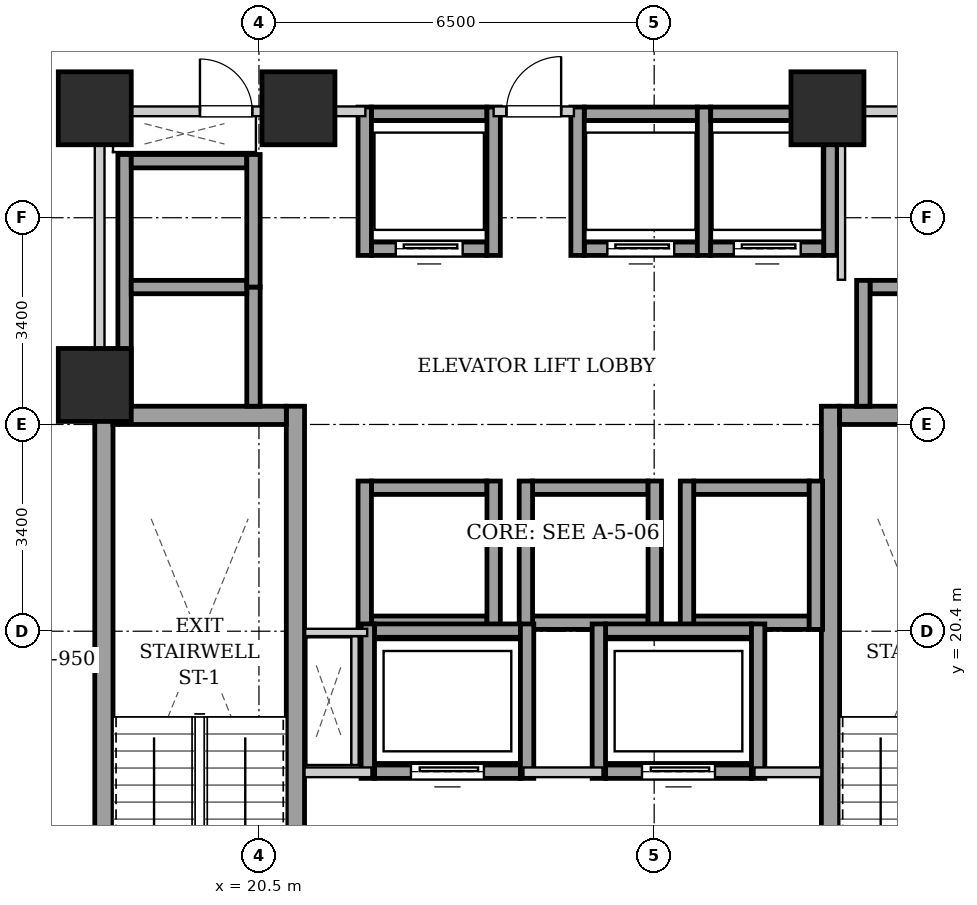
"""IFC4 building model, lengths in metres.
Left out: names, types, materials, properties, quantities, classifications, styles, units other than length and angle.
Written with IfcOpenShell. Run it as: python <this file> out.ifc"""

import sys

from ifc_helpers import new_model, si_unit, direction, frame, frame_2d, origin, origin_2d, place, context, subcontext, project, spatial, rectangle, extrude, element, fill, save


model = new_model("IFC4")
c1 = context("Model", 3, precision=1e-05, world=origin(), true_north=direction((0.0, 1.0)))
c2 = subcontext(c1, "Body", "Model", "MODEL_VIEW")
j1 = project(units=[si_unit("LENGTHUNIT", "METRE"), si_unit("PLANEANGLEUNIT", "RADIAN")], contexts=[c1])
p1 = place(None, origin())
s1 = spatial("IfcSite", under=j1, at=p1, CompositionType="ELEMENT")
p2 = place(p1, origin())
s2 = spatial("IfcBuilding", under=s1, at=p2, CompositionType="ELEMENT")
p3 = place(p2, frame((0.0, 0.0, 25.8)))
s3 = spatial("IfcBuildingStorey", under=s2, at=p3, CompositionType="ELEMENT", Elevation=25.8)
for number, where, z_axis, x_axis in (
    (1, (17.8, 29.0, 0.0), (0.0, 0.0, 1.0), (1.0, 0.0, 0.0)),
    (2, (21.15, 29.0, 0.0), (0.0, 0.0, 1.0), (1.0, 0.0, 0.0)),
    (3, (29.85, 29.0, 0.0), (0.0, 0.0, 1.0), (1.0, 0.0, 0.0)),
    (4, (17.8, 24.45, 0.0), (0.0, 0.0, 1.0), (1.0, 0.0, 0.0)),
):
    element("IfcColumn", number, at=place(p3, frame(where, z_axis=z_axis, x_axis=x_axis)), inside=s3, PredefinedType="COLUMN", context=c2, shape_type="SweptSolid", body=[
        extrude(rectangle(XDim=1.2, YDim=1.2, at=origin_2d()), origin(), (0.0, 0.0, 1.0), 3.2),
    ])
for number, where, z_axis, x_axis in (
    (5, (17.95, 15.1, 0.0), (0.0, 0.0, 1.0), (0.0, 1.0, 0.0)),
    (6, (21.1, 15.1, 0.0), (0.0, 0.0, 1.0), (0.0, 1.0, 0.0)),
):
    element("IfcWall", number, at=place(p3, frame(where, z_axis=z_axis, x_axis=x_axis)), inside=s3, PredefinedType="SHEAR", context=c2, shape_type="SweptSolid", body=[
        extrude(rectangle(XDim=9.0, YDim=0.3, at=frame_2d((4.5, 0.0))), origin(), (0.0, 0.0, 1.0), 2.94),
    ])
p4 = place(p3, frame((18.1, 23.95, 0.0), z_axis=(0.0, 0.0, 1.0), x_axis=(1.0, 0.0, 0.0)))
e7 = element("IfcWall", 7, at=p4, inside=s3, PredefinedType="SHEAR", context=c2, shape_type="SweptSolid", body=[
    extrude(rectangle(XDim=2.85, YDim=0.3, at=frame_2d((1.425, 0.0))), origin(), (0.0, 0.0, 1.0), 2.94),
])
p5 = place(p3, frame((29.9, 15.1, 0.0), z_axis=(0.0, 0.0, 1.0), x_axis=(0.0, 1.0, 0.0)))
e8 = element("IfcWall", 8, at=p5, inside=s3, PredefinedType="SHEAR", context=c2, shape_type="SweptSolid", body=[
    extrude(rectangle(XDim=9.0, YDim=0.3, at=frame_2d((4.5, 0.0))), origin(), (0.0, 0.0, 1.0), 2.94),
])
p6 = place(p3, frame((30.05, 23.95, 0.0), z_axis=(0.0, 0.0, 1.0), x_axis=(1.0, 0.0, 0.0)))
e9 = element("IfcWall", 9, at=p6, inside=s3, PredefinedType="SHEAR", context=c2, shape_type="SweptSolid", body=[
    extrude(rectangle(XDim=2.85, YDim=0.3, at=frame_2d((1.425, 0.0))), origin(), (0.0, 0.0, 1.0), 2.94),
])
p7 = place(p3, frame((22.35, 26.69, 0.0), z_axis=(0.0, 0.0, 1.0), x_axis=(1.0, 0.0, 0.0)))
e10 = element("IfcWall", 10, at=p7, inside=s3, PredefinedType="SHEAR", context=c2, shape_type="SweptSolid", body=[
    extrude(rectangle(XDim=1.9, YDim=0.22, at=frame_2d((0.95, 0.0))), origin(), (0.0, 0.0, 1.0), 2.94),
])
p8 = place(p7, frame((0.4, 0.0, 0.0)))
e11 = element("IfcOpeningElement", 11, at=p8, cuts=e10, PredefinedType="OPENING", context=c2, shape_type="SweptSolid", body=[
    extrude(rectangle(XDim=1.1, YDim=2.15, at=frame_2d((0.55, 1.075))), frame((0.0, 0.12, 0.0), z_axis=(0.0, -1.0, 0.0), x_axis=(1.0, 0.0, 0.0)), (0.0, 0.0, 1.0), 0.24),
])
p9 = place(p3, frame((22.35, 28.91, 0.0), z_axis=(0.0, 0.0, 1.0), x_axis=(1.0, 0.0, 0.0)))
e12 = element("IfcWall", 12, at=p9, inside=s3, PredefinedType="SHEAR", context=c2, shape_type="SweptSolid", body=[
    extrude(rectangle(XDim=1.9, YDim=0.22, at=frame_2d((0.95, 0.0))), origin(), (0.0, 0.0, 1.0), 2.94),
])
for number, where, z_axis, x_axis in (
    (13, (22.24, 26.58, 0.0), (0.0, 0.0, 1.0), (0.0, 1.0, 0.0)),
    (14, (24.36, 26.58, 0.0), (0.0, 0.0, 1.0), (0.0, 1.0, 0.0)),
):
    element("IfcWall", number, at=place(p3, frame(where, z_axis=z_axis, x_axis=x_axis)), inside=s3, PredefinedType="SHEAR", context=c2, shape_type="SweptSolid", body=[
        extrude(rectangle(XDim=2.44, YDim=0.22, at=frame_2d((1.22, 0.0))), origin(), (0.0, 0.0, 1.0), 2.94),
    ])
p10 = place(p3, frame((25.85, 26.69, 0.0), z_axis=(0.0, 0.0, 1.0), x_axis=(1.0, 0.0, 0.0)))
e15 = element("IfcWall", 15, at=p10, inside=s3, PredefinedType="SHEAR", context=c2, shape_type="SweptSolid", body=[
    extrude(rectangle(XDim=1.86, YDim=0.22, at=frame_2d((0.93, 0.0))), origin(), (0.0, 0.0, 1.0), 2.94),
])
p11 = place(p10, frame((0.38, 0.0, 0.0)))
e16 = element("IfcOpeningElement", 16, at=p11, cuts=e15, PredefinedType="OPENING", context=c2, shape_type="SweptSolid", body=[
    extrude(rectangle(XDim=1.1, YDim=2.15, at=frame_2d((0.55, 1.075))), frame((0.0, 0.12, 0.0), z_axis=(0.0, -1.0, 0.0), x_axis=(1.0, 0.0, 0.0)), (0.0, 0.0, 1.0), 0.24),
])
p12 = place(p3, frame((25.85, 28.91, 0.0), z_axis=(0.0, 0.0, 1.0), x_axis=(1.0, 0.0, 0.0)))
e17 = element("IfcWall", 17, at=p12, inside=s3, PredefinedType="SHEAR", context=c2, shape_type="SweptSolid", body=[
    extrude(rectangle(XDim=1.86, YDim=0.22, at=frame_2d((0.93, 0.0))), origin(), (0.0, 0.0, 1.0), 2.94),
])
for number, where, z_axis, x_axis in (
    (18, (25.74, 26.58, 0.0), (0.0, 0.0, 1.0), (0.0, 1.0, 0.0)),
    (19, (27.82, 26.58, 0.0), (0.0, 0.0, 1.0), (0.0, 1.0, 0.0)),
):
    element("IfcWall", number, at=place(p3, frame(where, z_axis=z_axis, x_axis=x_axis)), inside=s3, PredefinedType="SHEAR", context=c2, shape_type="SweptSolid", body=[
        extrude(rectangle(XDim=2.44, YDim=0.22, at=frame_2d((1.22, 0.0))), origin(), (0.0, 0.0, 1.0), 2.94),
    ])
p13 = place(p3, frame((27.93, 26.69, 0.0), z_axis=(0.0, 0.0, 1.0), x_axis=(1.0, 0.0, 0.0)))
e20 = element("IfcWall", 20, at=p13, inside=s3, PredefinedType="SHEAR", context=c2, shape_type="SweptSolid", body=[
    extrude(rectangle(XDim=1.86, YDim=0.22, at=frame_2d((0.93, 0.0))), origin(), (0.0, 0.0, 1.0), 2.94),
])
p14 = place(p13, frame((0.38, 0.0, 0.0)))
e21 = element("IfcOpeningElement", 21, at=p14, cuts=e20, PredefinedType="OPENING", context=c2, shape_type="SweptSolid", body=[
    extrude(rectangle(XDim=1.1, YDim=2.15, at=frame_2d((0.55, 1.075))), frame((0.0, 0.12, 0.0), z_axis=(0.0, -1.0, 0.0), x_axis=(1.0, 0.0, 0.0)), (0.0, 0.0, 1.0), 0.24),
])
p15 = place(p3, frame((27.93, 28.91, 0.0), z_axis=(0.0, 0.0, 1.0), x_axis=(1.0, 0.0, 0.0)))
e22 = element("IfcWall", 22, at=p15, inside=s3, PredefinedType="SHEAR", context=c2, shape_type="SweptSolid", body=[
    extrude(rectangle(XDim=1.86, YDim=0.22, at=frame_2d((0.93, 0.0))), origin(), (0.0, 0.0, 1.0), 2.94),
])
p16 = place(p3, frame((29.9, 26.58, 0.0), z_axis=(0.0, 0.0, 1.0), x_axis=(0.0, 1.0, 0.0)))
e23 = element("IfcWall", 23, at=p16, inside=s3, PredefinedType="SHEAR", context=c2, shape_type="SweptSolid", body=[
    extrude(rectangle(XDim=2.44, YDim=0.22, at=frame_2d((1.22, 0.0))), origin(), (0.0, 0.0, 1.0), 2.94),
])
for number, where, z_axis, x_axis in (
    (24, (22.35, 20.54, 0.0), (0.0, 0.0, 1.0), (1.0, 0.0, 0.0)),
    (25, (22.35, 22.76, 0.0), (0.0, 0.0, 1.0), (1.0, 0.0, 0.0)),
):
    element("IfcWall", number, at=place(p3, frame(where, z_axis=z_axis, x_axis=x_axis)), inside=s3, PredefinedType="SHEAR", context=c2, shape_type="SweptSolid", body=[
        extrude(rectangle(XDim=1.9, YDim=0.22, at=frame_2d((0.95, 0.0))), origin(), (0.0, 0.0, 1.0), 2.94),
    ])
for number, where, z_axis, x_axis in (
    (26, (22.24, 20.43, 0.0), (0.0, 0.0, 1.0), (0.0, 1.0, 0.0)),
    (27, (24.36, 20.43, 0.0), (0.0, 0.0, 1.0), (0.0, 1.0, 0.0)),
):
    element("IfcWall", number, at=place(p3, frame(where, z_axis=z_axis, x_axis=x_axis)), inside=s3, PredefinedType="SHEAR", context=c2, shape_type="SweptSolid", body=[
        extrude(rectangle(XDim=2.44, YDim=0.22, at=frame_2d((1.22, 0.0))), origin(), (0.0, 0.0, 1.0), 2.94),
    ])
for number, where, z_axis, x_axis in (
    (28, (25.0, 20.54, 0.0), (0.0, 0.0, 1.0), (1.0, 0.0, 0.0)),
    (29, (25.0, 22.76, 0.0), (0.0, 0.0, 1.0), (1.0, 0.0, 0.0)),
):
    element("IfcWall", number, at=place(p3, frame(where, z_axis=z_axis, x_axis=x_axis)), inside=s3, PredefinedType="SHEAR", context=c2, shape_type="SweptSolid", body=[
        extrude(rectangle(XDim=1.9, YDim=0.22, at=frame_2d((0.95, 0.0))), origin(), (0.0, 0.0, 1.0), 2.94),
    ])
for number, where, z_axis, x_axis in (
    (30, (24.89, 20.43, 0.0), (0.0, 0.0, 1.0), (0.0, 1.0, 0.0)),
    (31, (27.01, 20.43, 0.0), (0.0, 0.0, 1.0), (0.0, 1.0, 0.0)),
):
    element("IfcWall", number, at=place(p3, frame(where, z_axis=z_axis, x_axis=x_axis)), inside=s3, PredefinedType="SHEAR", context=c2, shape_type="SweptSolid", body=[
        extrude(rectangle(XDim=2.44, YDim=0.22, at=frame_2d((1.22, 0.0))), origin(), (0.0, 0.0, 1.0), 2.94),
    ])
for number, where, z_axis, x_axis in (
    (32, (27.65, 20.54, 0.0), (0.0, 0.0, 1.0), (1.0, 0.0, 0.0)),
    (33, (27.65, 22.76, 0.0), (0.0, 0.0, 1.0), (1.0, 0.0, 0.0)),
):
    element("IfcWall", number, at=place(p3, frame(where, z_axis=z_axis, x_axis=x_axis)), inside=s3, PredefinedType="SHEAR", context=c2, shape_type="SweptSolid", body=[
        extrude(rectangle(XDim=1.9, YDim=0.22, at=frame_2d((0.95, 0.0))), origin(), (0.0, 0.0, 1.0), 2.94),
    ])
for number, where, z_axis, x_axis in (
    (34, (27.54, 20.43, 0.0), (0.0, 0.0, 1.0), (0.0, 1.0, 0.0)),
    (35, (29.66, 20.43, 0.0), (0.0, 0.0, 1.0), (0.0, 1.0, 0.0)),
):
    element("IfcWall", number, at=place(p3, frame(where, z_axis=z_axis, x_axis=x_axis)), inside=s3, PredefinedType="SHEAR", context=c2, shape_type="SweptSolid", body=[
        extrude(rectangle(XDim=2.44, YDim=0.22, at=frame_2d((1.22, 0.0))), origin(), (0.0, 0.0, 1.0), 2.94),
    ])
p17 = place(p3, frame((18.29, 24.1, 0.0), z_axis=(0.0, 0.0, 1.0), x_axis=(0.0, 1.0, 0.0)))
e36 = element("IfcWall", 36, at=p17, inside=s3, PredefinedType="SHEAR", context=c2, shape_type="SweptSolid", body=[
    extrude(rectangle(XDim=4.14, YDim=0.22, at=frame_2d((2.07, 0.0))), origin(), (0.0, 0.0, 1.0), 2.94),
])
p18 = place(p3, frame((20.41, 24.1, 0.0), z_axis=(0.0, 0.0, 1.0), x_axis=(0.0, 1.0, 0.0)))
e37 = element("IfcWall", 37, at=p18, inside=s3, PredefinedType="SHEAR", context=c2, shape_type="SweptSolid", body=[
    extrude(rectangle(XDim=1.96, YDim=0.22, at=frame_2d((0.98, 0.0))), origin(), (0.0, 0.0, 1.0), 2.94),
])
for number, where, z_axis, x_axis in (
    (38, (18.4, 26.06, 0.0), (0.0, 0.0, 1.0), (1.0, 0.0, 0.0)),
    (39, (18.4, 28.13, 0.0), (0.0, 0.0, 1.0), (1.0, 0.0, 0.0)),
):
    element("IfcWall", number, at=place(p3, frame(where, z_axis=z_axis, x_axis=x_axis)), inside=s3, PredefinedType="SHEAR", context=c2, shape_type="SweptSolid", body=[
        extrude(rectangle(XDim=1.9, YDim=0.22, at=frame_2d((0.95, 0.0))), origin(), (0.0, 0.0, 1.0), 2.94),
    ])
p19 = place(p3, frame((20.41, 26.06, 0.0), z_axis=(0.0, 0.0, 1.0), x_axis=(0.0, 1.0, 0.0)))
e40 = element("IfcWall", 40, at=p19, inside=s3, PredefinedType="SHEAR", context=c2, shape_type="SweptSolid", body=[
    extrude(rectangle(XDim=2.18, YDim=0.22, at=frame_2d((1.09, 0.0))), origin(), (0.0, 0.0, 1.0), 2.94),
])
p20 = place(p3, frame((30.55, 26.06, 0.0), z_axis=(0.0, 0.0, 1.0), x_axis=(1.0, 0.0, 0.0)))
e41 = element("IfcWall", 41, at=p20, inside=s3, PredefinedType="SHEAR", context=c2, shape_type="SweptSolid", body=[
    extrude(rectangle(XDim=1.9, YDim=0.22, at=frame_2d((0.95, 0.0))), origin(), (0.0, 0.0, 1.0), 2.94),
])
p21 = place(p3, frame((30.44, 24.1, 0.0), z_axis=(0.0, 0.0, 1.0), x_axis=(0.0, 1.0, 0.0)))
e42 = element("IfcWall", 42, at=p21, inside=s3, PredefinedType="SHEAR", context=c2, shape_type="SweptSolid", body=[
    extrude(rectangle(XDim=2.07, YDim=0.22, at=frame_2d((1.035, 0.0))), origin(), (0.0, 0.0, 1.0), 2.94),
])
p22 = place(p3, frame((22.4, 18.09, 0.0), z_axis=(0.0, 0.0, 1.0), x_axis=(1.0, 0.0, 0.0)))
e43 = element("IfcWall", 43, at=p22, inside=s3, PredefinedType="SHEAR", context=c2, shape_type="SweptSolid", body=[
    extrude(rectangle(XDim=2.4, YDim=0.22, at=frame_2d((1.2, 0.0))), origin(), (0.0, 0.0, 1.0), 2.94),
])
p23 = place(p22, frame((0.6, 0.0, 0.0)))
e44 = element("IfcOpeningElement", 44, at=p23, cuts=e43, PredefinedType="OPENING", context=c2, shape_type="SweptSolid", body=[
    extrude(rectangle(XDim=1.2, YDim=2.15, at=frame_2d((0.6, 1.075))), frame((0.0, 0.12, 0.0), z_axis=(0.0, -1.0, 0.0), x_axis=(1.0, 0.0, 0.0)), (0.0, 0.0, 1.0), 0.24),
])
p24 = place(p3, frame((22.4, 20.41, 0.0), z_axis=(0.0, 0.0, 1.0), x_axis=(1.0, 0.0, 0.0)))
e45 = element("IfcWall", 45, at=p24, inside=s3, PredefinedType="SHEAR", context=c2, shape_type="SweptSolid", body=[
    extrude(rectangle(XDim=2.4, YDim=0.22, at=frame_2d((1.2, 0.0))), origin(), (0.0, 0.0, 1.0), 2.94),
])
for number, where, z_axis, x_axis in (
    (46, (22.29, 17.98, 0.0), (0.0, 0.0, 1.0), (0.0, 1.0, 0.0)),
    (47, (24.91, 17.98, 0.0), (0.0, 0.0, 1.0), (0.0, 1.0, 0.0)),
):
    element("IfcWall", number, at=place(p3, frame(where, z_axis=z_axis, x_axis=x_axis)), inside=s3, PredefinedType="SHEAR", context=c2, shape_type="SweptSolid", body=[
        extrude(rectangle(XDim=2.54, YDim=0.22, at=frame_2d((1.27, 0.0))), origin(), (0.0, 0.0, 1.0), 2.94),
    ])
p25 = place(p3, frame((26.2, 18.09, 0.0), z_axis=(0.0, 0.0, 1.0), x_axis=(1.0, 0.0, 0.0)))
e48 = element("IfcWall", 48, at=p25, inside=s3, PredefinedType="SHEAR", context=c2, shape_type="SweptSolid", body=[
    extrude(rectangle(XDim=2.4, YDim=0.22, at=frame_2d((1.2, 0.0))), origin(), (0.0, 0.0, 1.0), 2.94),
])
p26 = place(p25, frame((0.6, 0.0, 0.0)))
e49 = element("IfcOpeningElement", 49, at=p26, cuts=e48, PredefinedType="OPENING", context=c2, shape_type="SweptSolid", body=[
    extrude(rectangle(XDim=1.2, YDim=2.15, at=frame_2d((0.6, 1.075))), frame((0.0, 0.12, 0.0), z_axis=(0.0, -1.0, 0.0), x_axis=(1.0, 0.0, 0.0)), (0.0, 0.0, 1.0), 0.24),
])
p27 = place(p3, frame((26.2, 20.41, 0.0), z_axis=(0.0, 0.0, 1.0), x_axis=(1.0, 0.0, 0.0)))
e50 = element("IfcWall", 50, at=p27, inside=s3, PredefinedType="SHEAR", context=c2, shape_type="SweptSolid", body=[
    extrude(rectangle(XDim=2.4, YDim=0.22, at=frame_2d((1.2, 0.0))), origin(), (0.0, 0.0, 1.0), 2.94),
])
for number, where, z_axis, x_axis in (
    (51, (26.09, 17.98, 0.0), (0.0, 0.0, 1.0), (0.0, 1.0, 0.0)),
    (52, (28.71, 17.98, 0.0), (0.0, 0.0, 1.0), (0.0, 1.0, 0.0)),
):
    element("IfcWall", number, at=place(p3, frame(where, z_axis=z_axis, x_axis=x_axis)), inside=s3, PredefinedType="SHEAR", context=c2, shape_type="SweptSolid", body=[
        extrude(rectangle(XDim=2.54, YDim=0.22, at=frame_2d((1.27, 0.0))), origin(), (0.0, 0.0, 1.0), 2.94),
    ])
p28 = place(p3, frame((21.25, 18.08, 0.0), z_axis=(0.0, 0.0, 1.0), x_axis=(1.0, 0.0, 0.0)))
e53 = element("IfcWall", 53, at=p28, inside=s3, PredefinedType="PARTITIONING", context=c2, shape_type="SweptSolid", body=[
    extrude(rectangle(XDim=1.1, YDim=0.16, at=frame_2d((0.55, 0.0))), origin(), (0.0, 0.0, 1.0), 2.94),
])
p29 = place(p3, frame((24.85, 18.08, 0.0), z_axis=(0.0, 0.0, 1.0), x_axis=(1.0, 0.0, 0.0)))
e54 = element("IfcWall", 54, at=p29, inside=s3, PredefinedType="PARTITIONING", context=c2, shape_type="SweptSolid", body=[
    extrude(rectangle(XDim=1.3, YDim=0.16, at=frame_2d((0.65, 0.0))), origin(), (0.0, 0.0, 1.0), 2.94),
])
p30 = place(p3, frame((28.65, 18.08, 0.0), z_axis=(0.0, 0.0, 1.0), x_axis=(1.0, 0.0, 0.0)))
e55 = element("IfcWall", 55, at=p30, inside=s3, PredefinedType="PARTITIONING", context=c2, shape_type="SweptSolid", body=[
    extrude(rectangle(XDim=1.1, YDim=0.16, at=frame_2d((0.55, 0.0))), origin(), (0.0, 0.0, 1.0), 2.94),
])
p31 = place(p3, frame((17.88, 24.12, 0.0), z_axis=(0.0, 0.0, 1.0), x_axis=(0.0, 1.0, 0.0)))
e56 = element("IfcWall", 56, at=p31, inside=s3, PredefinedType="PARTITIONING", context=c2, shape_type="SweptSolid", body=[
    extrude(rectangle(XDim=4.76, YDim=0.16, at=frame_2d((2.38, 0.0))), origin(), (0.0, 0.0, 1.0), 2.94),
])
p32 = place(p3, frame((24.36, 28.95, 0.0), z_axis=(0.0, 0.0, 1.0), x_axis=(1.0, 0.0, 0.0)))
e57 = element("IfcWall", 57, at=p32, inside=s3, PredefinedType="PARTITIONING", context=c2, shape_type="SweptSolid", body=[
    extrude(rectangle(XDim=1.32, YDim=0.16, at=frame_2d((0.66, 0.0))), origin(), (0.0, 0.0, 1.0), 2.155),
])
p33 = place(p32, frame((0.21, 0.0, 0.0)))
e58 = element("IfcOpeningElement", 58, at=p33, cuts=e57, PredefinedType="OPENING", context=c2, shape_type="SweptSolid", body=[
    extrude(rectangle(XDim=0.9, YDim=2.05, at=frame_2d((0.45, 1.025))), frame((0.0, 0.09, 0.0), z_axis=(0.0, -1.0, 0.0), x_axis=(1.0, 0.0, 0.0)), (0.0, 0.0, 1.0), 0.18),
])
p34 = place(p3, frame((17.96, 28.95, 0.0), z_axis=(0.0, 0.0, 1.0), x_axis=(1.0, 0.0, 0.0)))
e59 = element("IfcWall", 59, at=p34, inside=s3, PredefinedType="PARTITIONING", context=c2, shape_type="SweptSolid", body=[
    extrude(rectangle(XDim=4.29, YDim=0.16, at=frame_2d((2.145, 0.0))), origin(), (0.0, 0.0, 1.0), 2.155),
])
p35 = place(p34, frame((1.57, 0.0, 0.0)))
e60 = element("IfcOpeningElement", 60, at=p35, cuts=e59, PredefinedType="OPENING", context=c2, shape_type="SweptSolid", body=[
    extrude(rectangle(XDim=0.86, YDim=2.05, at=frame_2d((0.43, 1.025))), frame((0.0, 0.09, 0.0), z_axis=(0.0, -1.0, 0.0), x_axis=(1.0, 0.0, 0.0)), (0.0, 0.0, 1.0), 0.18),
])
p36 = place(p3, frame((22.08, 18.2, 0.0), z_axis=(0.0, 0.0, 1.0), x_axis=(0.0, 1.0, 0.0)))
e61 = element("IfcWall", 61, at=p36, inside=s3, PredefinedType="PARTITIONING", context=c2, shape_type="SweptSolid", body=[
    extrude(rectangle(XDim=2.12, YDim=0.12, at=frame_2d((1.06, 0.0))), origin(), (0.0, 0.0, 1.0), 2.94),
])
p37 = place(p3, frame((22.28, 20.38, 0.0), z_axis=(0.0, 0.0, 1.0), x_axis=(-1.0, 0.0, 0.0)))
e62 = element("IfcWall", 62, at=p37, inside=s3, PredefinedType="PARTITIONING", context=c2, shape_type="SweptSolid", body=[
    extrude(rectangle(XDim=1.02, YDim=0.12, at=frame_2d((0.51, 0.0))), origin(), (0.0, 0.0, 1.0), 2.94),
])
p38 = place(p3, frame((30.08, 26.18, 0.0), z_axis=(0.0, 0.0, 1.0), x_axis=(0.0, 1.0, 0.0)))
e63 = element("IfcWall", 63, at=p38, inside=s3, PredefinedType="PARTITIONING", context=c2, shape_type="SweptSolid", body=[
    extrude(rectangle(XDim=2.68, YDim=0.12, at=frame_2d((1.34, 0.0))), origin(), (0.0, 0.0, 1.0), 2.94),
])
p39 = place(p3, frame((30.08, 28.95, 0.0), z_axis=(0.0, 0.0, 1.0), x_axis=(1.0, 0.0, 0.0)))
e64 = element("IfcWall", 64, at=p39, inside=s3, PredefinedType="PARTITIONING", context=c2, shape_type="SweptSolid", body=[
    extrude(rectangle(XDim=2.96, YDim=0.16, at=frame_2d((1.48, 0.0))), origin(), (0.0, 0.0, 1.0), 2.94),
])
p40 = place(p39, frame((1.045, 0.0, 0.0)))
e65 = element("IfcOpeningElement", 65, at=p40, cuts=e64, PredefinedType="OPENING", context=c2, shape_type="SweptSolid", body=[
    extrude(rectangle(XDim=0.86, YDim=2.05, at=frame_2d((0.43, 1.025))), frame((0.0, 0.09, 0.0), z_axis=(0.0, -1.0, 0.0), x_axis=(1.0, 0.0, 0.0)), (0.0, 0.0, 1.0), 0.18),
])
p41 = place(p8, origin())
e66 = element("IfcDoor", 66, at=p41, inside=s3, OperationType="SLIDING_TO_LEFT", PredefinedType="DOOR", context=c2, shape_type="SweptSolid", body=[
    extrude(rectangle(XDim=1.1, YDim=2.15, at=frame_2d((0.55, 1.075))), frame((0.0, 0.025, 0.0), z_axis=(0.0, -1.0, 0.0), x_axis=(1.0, 0.0, 0.0)), (0.0, 0.0, 1.0), 0.05),
])
fill(e11, e66)
p42 = place(p11, origin())
e67 = element("IfcDoor", 67, at=p42, inside=s3, OperationType="SLIDING_TO_LEFT", PredefinedType="DOOR", context=c2, shape_type="SweptSolid", body=[
    extrude(rectangle(XDim=1.1, YDim=2.15, at=frame_2d((0.55, 1.075))), frame((0.0, 0.025, 0.0), z_axis=(0.0, -1.0, 0.0), x_axis=(1.0, 0.0, 0.0)), (0.0, 0.0, 1.0), 0.05),
])
fill(e16, e67)
p43 = place(p14, origin())
e68 = element("IfcDoor", 68, at=p43, inside=s3, OperationType="SLIDING_TO_LEFT", PredefinedType="DOOR", context=c2, shape_type="SweptSolid", body=[
    extrude(rectangle(XDim=1.1, YDim=2.15, at=frame_2d((0.55, 1.075))), frame((0.0, 0.025, 0.0), z_axis=(0.0, -1.0, 0.0), x_axis=(1.0, 0.0, 0.0)), (0.0, 0.0, 1.0), 0.05),
])
fill(e21, e68)
p44 = place(p23, origin())
e69 = element("IfcDoor", 69, at=p44, inside=s3, OperationType="SLIDING_TO_LEFT", PredefinedType="DOOR", context=c2, shape_type="SweptSolid", body=[
    extrude(rectangle(XDim=1.2, YDim=2.15, at=frame_2d((0.6, 1.075))), frame((0.0, 0.025, 0.0), z_axis=(0.0, -1.0, 0.0), x_axis=(1.0, 0.0, 0.0)), (0.0, 0.0, 1.0), 0.05),
])
fill(e44, e69)
p45 = place(p26, origin())
e70 = element("IfcDoor", 70, at=p45, inside=s3, OperationType="SLIDING_TO_LEFT", PredefinedType="DOOR", context=c2, shape_type="SweptSolid", body=[
    extrude(rectangle(XDim=1.2, YDim=2.15, at=frame_2d((0.6, 1.075))), frame((0.0, 0.025, 0.0), z_axis=(0.0, -1.0, 0.0), x_axis=(1.0, 0.0, 0.0)), (0.0, 0.0, 1.0), 0.05),
])
fill(e49, e70)
p46 = place(p33, origin())
e71 = element("IfcDoor", 71, at=p46, inside=s3, OperationType="SINGLE_SWING_RIGHT", PredefinedType="DOOR", context=c2, shape_type="SweptSolid", body=[
    extrude(rectangle(XDim=0.9, YDim=2.05, at=frame_2d((0.45, 1.025))), frame((0.0, 0.025, 0.0), z_axis=(0.0, -1.0, 0.0), x_axis=(1.0, 0.0, 0.0)), (0.0, 0.0, 1.0), 0.05),
])
fill(e58, e71)
p47 = place(p35, origin())
e72 = element("IfcDoor", 72, at=p47, inside=s3, OperationType="SINGLE_SWING_LEFT", PredefinedType="DOOR", context=c2, shape_type="SweptSolid", body=[
    extrude(rectangle(XDim=0.86, YDim=2.05, at=frame_2d((0.43, 1.025))), frame((0.0, 0.025, 0.0), z_axis=(0.0, -1.0, 0.0), x_axis=(1.0, 0.0, 0.0)), (0.0, 0.0, 1.0), 0.05),
])
fill(e60, e72)
save(model, sys.argv[1])
